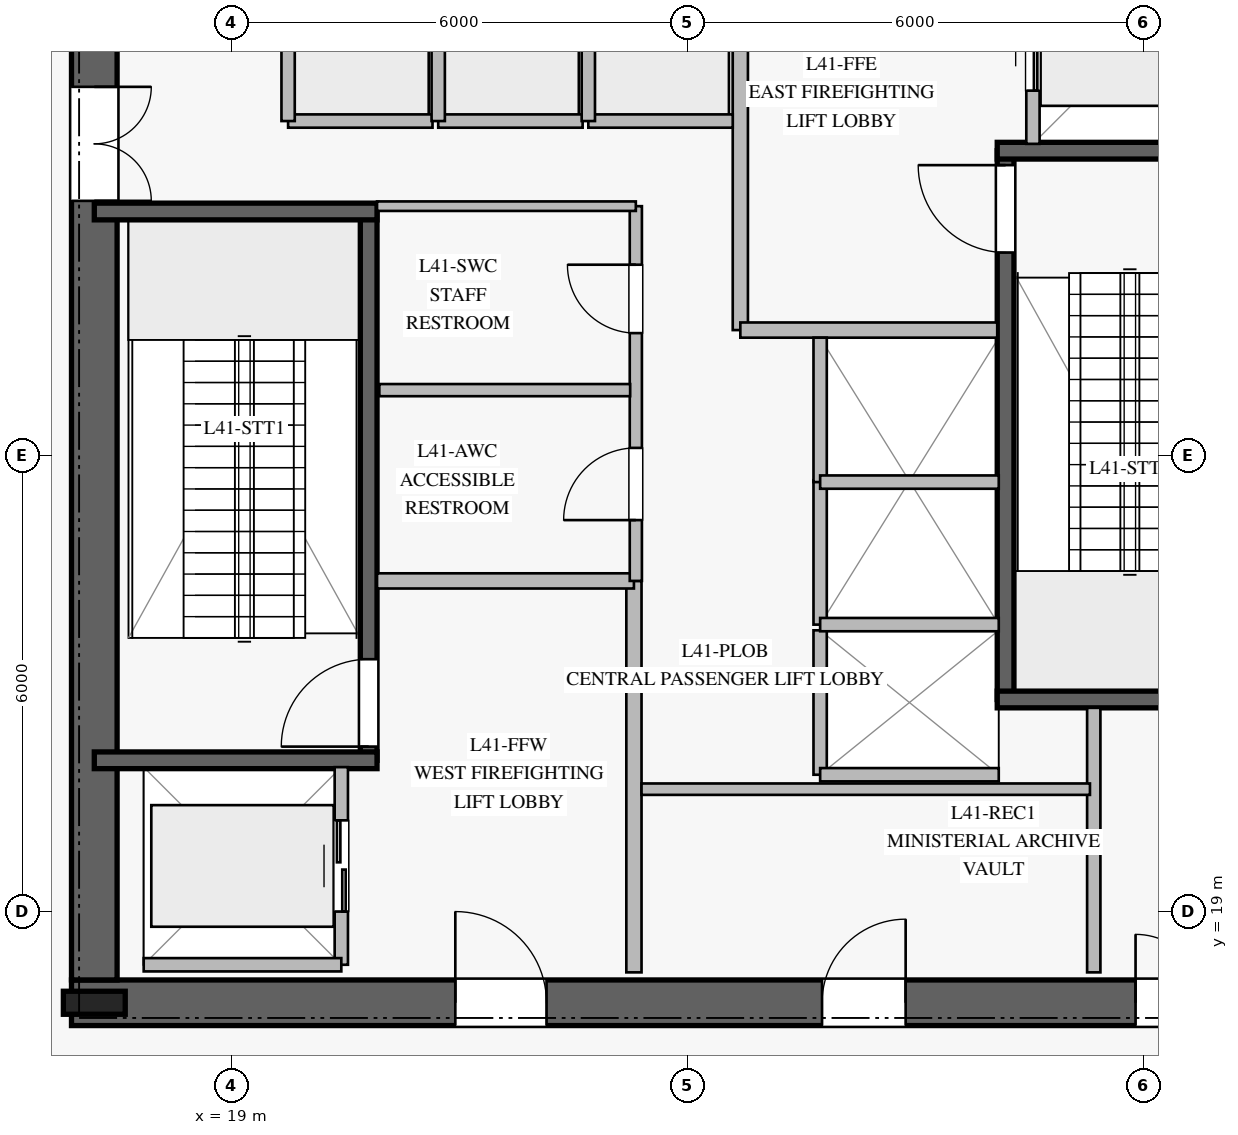
"""IFC4 building model, lengths in metres.
Left out: names, types, materials, properties, quantities, classifications, styles, units other than length and angle.
Written with IfcOpenShell. Run it as: python <this file> out.ifc"""

import sys

from ifc_helpers import new_model, si_unit, direction, frame, frame_2d, origin, origin_2d, place, context, subcontext, project, spatial, rectangle, i_section, extrude, element, fill, save


model = new_model("IFC4")
c1 = context("Model", 3, precision=1e-05, world=origin(), true_north=direction((0.0, 1.0)))
c2 = subcontext(c1, "Body", "Model", "MODEL_VIEW")
j1 = project(units=[si_unit("LENGTHUNIT", "METRE"), si_unit("PLANEANGLEUNIT", "RADIAN")], contexts=[c1])
p1 = place(None, origin())
s1 = spatial("IfcSite", under=j1, at=p1, CompositionType="ELEMENT")
p2 = place(p1, origin())
s2 = spatial("IfcBuilding", under=s1, at=p2, CompositionType="ELEMENT")
p3 = place(p2, frame((0.0, 0.0, 170.4)))
s3 = spatial("IfcBuildingStorey", under=s2, at=p3, CompositionType="ELEMENT", Elevation=170.4)
p4 = place(p3, frame((16.9, 17.8, 0.0), z_axis=(0.0, 0.0, 1.0), x_axis=(1.0, 0.0, 0.0)))
e1 = element("IfcWall", 1, at=p4, inside=s3, PredefinedType="SHEAR", context=c2, shape_type="SweptSolid", body=[
    extrude(rectangle(XDim=16.2, YDim=0.6, at=frame_2d((8.1, 0.0))), origin(), (0.0, 0.0, 1.0), 5.14),
])
p5 = place(p4, frame((5.05, 0.0, 0.0)))
e2 = element("IfcOpeningElement", 2, at=p5, cuts=e1, PredefinedType="OPENING", context=c2, shape_type="SweptSolid", body=[
    extrude(rectangle(XDim=1.2, YDim=2.25, at=frame_2d((0.6, 1.125))), frame((0.0, 0.31, 0.0), z_axis=(0.0, -1.0, 0.0), x_axis=(1.0, 0.0, 0.0)), (0.0, 0.0, 1.0), 0.62),
])
p6 = place(p4, frame((14.0, 0.0, 0.0)))
e3 = element("IfcOpeningElement", 3, at=p6, cuts=e1, PredefinedType="OPENING", context=c2, shape_type="SweptSolid", body=[
    extrude(rectangle(XDim=0.9, YDim=2.1, at=frame_2d((0.45, 1.05))), frame((0.0, 0.31, 0.0), z_axis=(0.0, -1.0, 0.0), x_axis=(1.0, 0.0, 0.0)), (0.0, 0.0, 1.0), 0.62),
])
p7 = place(p4, frame((9.875, 0.0, 0.0)))
e4 = element("IfcOpeningElement", 4, at=p7, cuts=e1, PredefinedType="OPENING", context=c2, shape_type="SweptSolid", body=[
    extrude(rectangle(XDim=1.1, YDim=2.2, at=frame_2d((0.55, 1.1))), frame((0.0, 0.31, 0.0), z_axis=(0.0, -1.0, 0.0), x_axis=(1.0, 0.0, 0.0)), (0.0, 0.0, 1.0), 0.62),
])
p8 = place(p3, frame((17.2, 31.9, 0.0), z_axis=(0.0, 0.0, 1.0), x_axis=(0.0, -1.0, 0.0)))
e5 = element("IfcWall", 5, at=p8, inside=s3, PredefinedType="SHEAR", context=c2, shape_type="SweptSolid", body=[
    extrude(rectangle(XDim=13.8, YDim=0.6, at=frame_2d((6.9, 0.0))), origin(), (0.0, 0.0, 1.0), 5.14),
])
p9 = place(p8, frame((2.05, 0.0, 0.0)))
e6 = element("IfcOpeningElement", 6, at=p9, cuts=e5, PredefinedType="OPENING", context=c2, shape_type="SweptSolid", body=[
    extrude(rectangle(XDim=1.5, YDim=2.2, at=frame_2d((0.75, 1.1))), frame((0.0, 0.31, 0.0), z_axis=(0.0, -1.0, 0.0), x_axis=(1.0, 0.0, 0.0)), (0.0, 0.0, 1.0), 0.62),
])
p10 = place(p3, frame((17.2, 17.8, 0.0), z_axis=(0.0, 0.0, 1.0), x_axis=(1.0, 0.0, 0.0)))
e7 = element("IfcColumn", 7, at=p10, inside=s3, PredefinedType="COLUMN", context=c2, shape_type="SweptSolid", body=[
    extrude(i_section(OverallWidth=0.303, OverallDepth=0.814, WebThickness=0.021, FlangeThickness=0.04, at=origin_2d()), origin(), (0.0, 0.0, 1.0), 5.4),
])
p11 = place(p3, frame((20.81, 20.99, 0.0), z_axis=(0.0, 0.0, 1.0), x_axis=(0.0, 1.0, 0.0)))
e8 = element("IfcWall", 8, at=p11, inside=s3, PredefinedType="SOLIDWALL", context=c2, shape_type="SweptSolid", body=[
    extrude(rectangle(XDim=7.22, YDim=0.22, at=frame_2d((3.61, 0.0))), origin(), (0.0, 0.0, 1.0), 5.14),
])
p12 = place(p11, frame((0.18, 0.0, 0.0)))
e9 = element("IfcOpeningElement", 9, at=p12, cuts=e8, PredefinedType="OPENING", context=c2, shape_type="SweptSolid", body=[
    extrude(rectangle(XDim=1.15, YDim=2.2, at=frame_2d((0.575, 1.1))), frame((0.0, 0.12, 0.0), z_axis=(0.0, -1.0, 0.0), x_axis=(1.0, 0.0, 0.0)), (0.0, 0.0, 1.0), 0.24),
])
for number, where, z_axis, x_axis in (
    (10, (17.2, 20.99, 0.0), (0.0, 0.0, 1.0), (1.0, 0.0, 0.0)),
    (11, (17.2, 28.21, 0.0), (0.0, 0.0, 1.0), (1.0, 0.0, 0.0)),
):
    element("IfcWall", number, at=place(p3, frame(where, z_axis=z_axis, x_axis=x_axis)), inside=s3, PredefinedType="SOLIDWALL", context=c2, shape_type="SweptSolid", body=[
        extrude(rectangle(XDim=3.72, YDim=0.22, at=frame_2d((1.86, 0.0))), origin(), (0.0, 0.0, 1.0), 5.14),
    ])
p13 = place(p3, frame((29.19, 21.79, 0.0), z_axis=(0.0, 0.0, 1.0), x_axis=(0.0, 1.0, 0.0)))
e12 = element("IfcWall", 12, at=p13, inside=s3, PredefinedType="SOLIDWALL", context=c2, shape_type="SweptSolid", body=[
    extrude(rectangle(XDim=7.22, YDim=0.22, at=frame_2d((3.61, 0.0))), origin(), (0.0, 0.0, 1.0), 5.14),
])
p14 = place(p13, frame((5.88, 0.0, 0.0)))
e13 = element("IfcOpeningElement", 13, at=p14, cuts=e12, PredefinedType="OPENING", context=c2, shape_type="SweptSolid", body=[
    extrude(rectangle(XDim=1.15, YDim=2.2, at=frame_2d((0.575, 1.1))), frame((0.0, 0.12, 0.0), z_axis=(0.0, -1.0, 0.0), x_axis=(1.0, 0.0, 0.0)), (0.0, 0.0, 1.0), 0.24),
])
for number, where, z_axis, x_axis in (
    (14, (29.08, 21.79, 0.0), (0.0, 0.0, 1.0), (1.0, 0.0, 0.0)),
    (15, (29.08, 29.01, 0.0), (0.0, 0.0, 1.0), (1.0, 0.0, 0.0)),
):
    element("IfcWall", number, at=place(p3, frame(where, z_axis=z_axis, x_axis=x_axis)), inside=s3, PredefinedType="SOLIDWALL", context=c2, shape_type="SweptSolid", body=[
        extrude(rectangle(XDim=3.72, YDim=0.22, at=frame_2d((1.86, 0.0))), origin(), (0.0, 0.0, 1.0), 5.14),
    ])
p15 = place(p3, frame((24.3, 18.2, 0.0), z_axis=(0.0, 0.0, 1.0), x_axis=(0.0, 1.0, 0.0)))
e16 = element("IfcWall", 16, at=p15, inside=s3, PredefinedType="PARTITIONING", context=c2, shape_type="SweptSolid", body=[
    extrude(rectangle(XDim=5.15, YDim=0.2, at=frame_2d((2.575, 0.0))), origin(), (0.0, 0.0, 1.0), 5.14),
])
p16 = place(p3, frame((20.92, 23.35, 0.0), z_axis=(0.0, 0.0, 1.0), x_axis=(1.0, 0.0, 0.0)))
e17 = element("IfcWall", 17, at=p16, inside=s3, PredefinedType="PARTITIONING", context=c2, shape_type="SweptSolid", body=[
    extrude(rectangle(XDim=3.38, YDim=0.2, at=frame_2d((1.69, 0.0))), origin(), (0.0, 0.0, 1.0), 5.14),
])
p17 = place(p3, frame((25.7, 26.65, 0.0), z_axis=(0.0, 0.0, 1.0), x_axis=(0.0, 1.0, 0.0)))
e18 = element("IfcWall", 18, at=p17, inside=s3, PredefinedType="PARTITIONING", context=c2, shape_type="SweptSolid", body=[
    extrude(rectangle(XDim=5.15, YDim=0.2, at=frame_2d((2.575, 0.0))), origin(), (0.0, 0.0, 1.0), 5.14),
])
p18 = place(p3, frame((25.7, 26.65, 0.0), z_axis=(0.0, 0.0, 1.0), x_axis=(1.0, 0.0, 0.0)))
e19 = element("IfcWall", 19, at=p18, inside=s3, PredefinedType="PARTITIONING", context=c2, shape_type="SweptSolid", body=[
    extrude(rectangle(XDim=3.38, YDim=0.2, at=frame_2d((1.69, 0.0))), origin(), (0.0, 0.0, 1.0), 5.14),
])
p19 = place(p3, frame((24.325, 23.35, 0.0), z_axis=(0.0, 0.0, 1.0), x_axis=(0.0, 1.0, 0.0)))
e20 = element("IfcWall", 20, at=p19, inside=s3, PredefinedType="PLUMBINGWALL", context=c2, shape_type="SweptSolid", body=[
    extrude(rectangle(XDim=4.93, YDim=0.16, at=frame_2d((2.465, 0.0))), origin(), (0.0, 0.0, 1.0), 5.14),
])
p20 = place(p19, frame((0.8, 0.0, 0.0)))
e21 = element("IfcOpeningElement", 21, at=p20, cuts=e20, PredefinedType="OPENING", context=c2, shape_type="SweptSolid", body=[
    extrude(rectangle(XDim=0.95, YDim=2.1, at=frame_2d((0.475, 1.05))), frame((0.0, 0.09, 0.0), z_axis=(0.0, -1.0, 0.0), x_axis=(1.0, 0.0, 0.0)), (0.0, 0.0, 1.0), 0.18),
])
p21 = place(p19, frame((3.26, 0.0, 0.0)))
e22 = element("IfcOpeningElement", 22, at=p21, cuts=e20, PredefinedType="OPENING", context=c2, shape_type="SweptSolid", body=[
    extrude(rectangle(XDim=0.9, YDim=2.1, at=frame_2d((0.45, 1.05))), frame((0.0, 0.09, 0.0), z_axis=(0.0, -1.0, 0.0), x_axis=(1.0, 0.0, 0.0)), (0.0, 0.0, 1.0), 0.18),
])
p22 = place(p3, frame((20.92, 28.28, 0.0), z_axis=(0.0, 0.0, 1.0), x_axis=(1.0, 0.0, 0.0)))
e23 = element("IfcWall", 23, at=p22, inside=s3, PredefinedType="PARTITIONING", context=c2, shape_type="SweptSolid", body=[
    extrude(rectangle(XDim=3.405, YDim=0.125, at=frame_2d((1.703, 0.0))), origin(), (0.0, 0.0, 1.0), 5.14),
])
p23 = place(p3, frame((20.95, 25.86, 0.0), z_axis=(0.0, 0.0, 1.0), x_axis=(1.0, 0.0, 0.0)))
e24 = element("IfcWall", 24, at=p23, inside=s3, PredefinedType="PLUMBINGWALL", context=c2, shape_type="SweptSolid", body=[
    extrude(rectangle(XDim=3.3, YDim=0.16, at=frame_2d((1.65, 0.0))), origin(), (0.0, 0.0, 1.0), 5.14),
])
p24 = place(p3, frame((30.35, 18.2, 0.0), z_axis=(0.0, 0.0, 1.0), x_axis=(0.0, 1.0, 0.0)))
e25 = element("IfcWall", 25, at=p24, inside=s3, PredefinedType="PARTITIONING", context=c2, shape_type="SweptSolid", body=[
    extrude(rectangle(XDim=3.48, YDim=0.175, at=frame_2d((1.74, 0.0))), origin(), (0.0, 0.0, 1.0), 5.14),
])
p25 = place(p3, frame((24.4, 20.61, 0.0), z_axis=(0.0, 0.0, 1.0), x_axis=(1.0, 0.0, 0.0)))
e26 = element("IfcWall", 26, at=p25, inside=s3, PredefinedType="PARTITIONING", context=c2, shape_type="SweptSolid", body=[
    extrude(rectangle(XDim=5.9, YDim=0.15, at=frame_2d((2.95, 0.0))), origin(), (0.0, 0.0, 1.0), 5.14),
])
p26 = place(p3, frame((19.75, 29.4, 0.0), z_axis=(0.0, 0.0, 1.0), x_axis=(1.0, 0.0, 0.0)))
e27 = element("IfcWall", 27, at=p26, inside=s3, PredefinedType="PARTITIONING", context=c2, shape_type="SweptSolid", body=[
    extrude(rectangle(XDim=1.9, YDim=0.175, at=frame_2d((0.95, 0.0))), origin(), (0.0, 0.0, 1.0), 5.14),
])
p27 = place(p3, frame((19.75, 29.4, 0.0), z_axis=(0.0, 0.0, 1.0), x_axis=(0.0, 1.0, 0.0)))
e28 = element("IfcWall", 28, at=p27, inside=s3, PredefinedType="PARTITIONING", context=c2, shape_type="SweptSolid", body=[
    extrude(rectangle(XDim=2.35, YDim=0.175, at=frame_2d((1.175, 0.0))), origin(), (0.0, 0.0, 1.0), 5.14),
])
p28 = place(p3, frame((21.725, 29.4, 0.0), z_axis=(0.0, 0.0, 1.0), x_axis=(1.0, 0.0, 0.0)))
e29 = element("IfcWall", 29, at=p28, inside=s3, PredefinedType="PARTITIONING", context=c2, shape_type="SweptSolid", body=[
    extrude(rectangle(XDim=1.9, YDim=0.175, at=frame_2d((0.95, 0.0))), origin(), (0.0, 0.0, 1.0), 5.14),
])
p29 = place(p3, frame((21.725, 29.4, 0.0), z_axis=(0.0, 0.0, 1.0), x_axis=(0.0, 1.0, 0.0)))
e30 = element("IfcWall", 30, at=p29, inside=s3, PredefinedType="PARTITIONING", context=c2, shape_type="SweptSolid", body=[
    extrude(rectangle(XDim=2.35, YDim=0.175, at=frame_2d((1.175, 0.0))), origin(), (0.0, 0.0, 1.0), 5.14),
])
p30 = place(p3, frame((23.7, 29.4, 0.0), z_axis=(0.0, 0.0, 1.0), x_axis=(1.0, 0.0, 0.0)))
e31 = element("IfcWall", 31, at=p30, inside=s3, PredefinedType="PARTITIONING", context=c2, shape_type="SweptSolid", body=[
    extrude(rectangle(XDim=1.9, YDim=0.175, at=frame_2d((0.95, 0.0))), origin(), (0.0, 0.0, 1.0), 5.14),
])
p31 = place(p3, frame((23.7, 29.4, 0.0), z_axis=(0.0, 0.0, 1.0), x_axis=(0.0, 1.0, 0.0)))
e32 = element("IfcWall", 32, at=p31, inside=s3, PredefinedType="PARTITIONING", context=c2, shape_type="SweptSolid", body=[
    extrude(rectangle(XDim=2.35, YDim=0.175, at=frame_2d((1.175, 0.0))), origin(), (0.0, 0.0, 1.0), 5.14),
])
p32 = place(p3, frame((26.75, 20.8, 0.0), z_axis=(0.0, 0.0, 1.0), x_axis=(0.0, 1.0, 0.0)))
e33 = element("IfcWall", 33, at=p32, inside=s3, PredefinedType="PARTITIONING", context=c2, shape_type="SweptSolid", body=[
    extrude(rectangle(XDim=1.9, YDim=0.175, at=frame_2d((0.95, 0.0))), origin(), (0.0, 0.0, 1.0), 5.14),
])
p33 = place(p3, frame((26.75, 20.8, 0.0), z_axis=(0.0, 0.0, 1.0), x_axis=(1.0, 0.0, 0.0)))
e34 = element("IfcWall", 34, at=p33, inside=s3, PredefinedType="PARTITIONING", context=c2, shape_type="SweptSolid", body=[
    extrude(rectangle(XDim=2.35, YDim=0.175, at=frame_2d((1.175, 0.0))), origin(), (0.0, 0.0, 1.0), 5.14),
])
p34 = place(p3, frame((26.75, 22.775, 0.0), z_axis=(0.0, 0.0, 1.0), x_axis=(0.0, 1.0, 0.0)))
e35 = element("IfcWall", 35, at=p34, inside=s3, PredefinedType="PARTITIONING", context=c2, shape_type="SweptSolid", body=[
    extrude(rectangle(XDim=1.9, YDim=0.175, at=frame_2d((0.95, 0.0))), origin(), (0.0, 0.0, 1.0), 5.14),
])
p35 = place(p3, frame((26.75, 22.775, 0.0), z_axis=(0.0, 0.0, 1.0), x_axis=(1.0, 0.0, 0.0)))
e36 = element("IfcWall", 36, at=p35, inside=s3, PredefinedType="PARTITIONING", context=c2, shape_type="SweptSolid", body=[
    extrude(rectangle(XDim=2.35, YDim=0.175, at=frame_2d((1.175, 0.0))), origin(), (0.0, 0.0, 1.0), 5.14),
])
p36 = place(p3, frame((26.75, 24.65, 0.0), z_axis=(0.0, 0.0, 1.0), x_axis=(0.0, 1.0, 0.0)))
e37 = element("IfcWall", 37, at=p36, inside=s3, PredefinedType="PARTITIONING", context=c2, shape_type="SweptSolid", body=[
    extrude(rectangle(XDim=1.9, YDim=0.175, at=frame_2d((0.95, 0.0))), origin(), (0.0, 0.0, 1.0), 5.14),
])
p37 = place(p3, frame((26.75, 24.65, 0.0), z_axis=(0.0, 0.0, 1.0), x_axis=(1.0, 0.0, 0.0)))
e38 = element("IfcWall", 38, at=p37, inside=s3, PredefinedType="PARTITIONING", context=c2, shape_type="SweptSolid", body=[
    extrude(rectangle(XDim=2.35, YDim=0.175, at=frame_2d((1.175, 0.0))), origin(), (0.0, 0.0, 1.0), 5.14),
])
p38 = place(p3, frame((20.45, 18.3, 0.0), z_axis=(0.0, 0.0, 1.0), x_axis=(0.0, 1.0, 0.0)))
e39 = element("IfcWall", 39, at=p38, inside=s3, PredefinedType="PARTITIONING", context=c2, shape_type="SweptSolid", body=[
    extrude(rectangle(XDim=2.6, YDim=0.175, at=frame_2d((1.3, 0.0))), origin(), (0.0, 0.0, 1.0), 5.14),
])
p39 = place(p38, frame((0.7, 0.0, 0.0)))
e40 = element("IfcOpeningElement", 40, at=p39, cuts=e39, PredefinedType="OPENING", context=c2, shape_type="SweptSolid", body=[
    extrude(rectangle(XDim=1.2, YDim=2.2, at=frame_2d((0.6, 1.1))), frame((0.0, 0.098, 0.0), z_axis=(0.0, -1.0, 0.0), x_axis=(1.0, 0.0, 0.0)), (0.0, 0.0, 1.0), 0.195),
])
p40 = place(p3, frame((17.85, 18.3, 0.0), z_axis=(0.0, 0.0, 1.0), x_axis=(1.0, 0.0, 0.0)))
e41 = element("IfcWall", 41, at=p40, inside=s3, PredefinedType="PARTITIONING", context=c2, shape_type="SweptSolid", body=[
    extrude(rectangle(XDim=2.6, YDim=0.175, at=frame_2d((1.3, 0.0))), origin(), (0.0, 0.0, 1.0), 5.14),
])
p41 = place(p3, frame((29.55, 29.1, 0.0), z_axis=(0.0, 0.0, 1.0), x_axis=(0.0, 1.0, 0.0)))
e42 = element("IfcWall", 42, at=p41, inside=s3, PredefinedType="PARTITIONING", context=c2, shape_type="SweptSolid", body=[
    extrude(rectangle(XDim=2.6, YDim=0.175, at=frame_2d((1.3, 0.0))), origin(), (0.0, 0.0, 1.0), 5.14),
])
p42 = place(p41, frame((0.7, 0.0, 0.0)))
e43 = element("IfcOpeningElement", 43, at=p42, cuts=e42, PredefinedType="OPENING", context=c2, shape_type="SweptSolid", body=[
    extrude(rectangle(XDim=1.2, YDim=2.2, at=frame_2d((0.6, 1.1))), frame((0.0, 0.098, 0.0), z_axis=(0.0, -1.0, 0.0), x_axis=(1.0, 0.0, 0.0)), (0.0, 0.0, 1.0), 0.195),
])
p43 = place(p12, origin())
e44 = element("IfcDoor", 44, at=p43, inside=s3, OperationType="SINGLE_SWING_LEFT", PredefinedType="DOOR", context=c2, shape_type="SweptSolid", body=[
    extrude(rectangle(XDim=1.15, YDim=2.2, at=frame_2d((0.575, 1.1))), frame((0.0, 0.025, 0.0), z_axis=(0.0, -1.0, 0.0), x_axis=(1.0, 0.0, 0.0)), (0.0, 0.0, 1.0), 0.05),
])
fill(e9, e44)
p44 = place(p14, origin())
e45 = element("IfcDoor", 45, at=p44, inside=s3, OperationType="SINGLE_SWING_RIGHT", PredefinedType="DOOR", context=c2, shape_type="SweptSolid", body=[
    extrude(rectangle(XDim=1.15, YDim=2.2, at=frame_2d((0.575, 1.1))), frame((0.0, 0.025, 0.0), z_axis=(0.0, -1.0, 0.0), x_axis=(1.0, 0.0, 0.0)), (0.0, 0.0, 1.0), 0.05),
])
fill(e13, e45)
p45 = place(p5, origin())
e46 = element("IfcDoor", 46, at=p45, inside=s3, OperationType="SINGLE_SWING_LEFT", PredefinedType="DOOR", context=c2, shape_type="SweptSolid", body=[
    extrude(rectangle(XDim=1.2, YDim=2.25, at=frame_2d((0.6, 1.125))), frame((0.0, 0.025, 0.0), z_axis=(0.0, -1.0, 0.0), x_axis=(1.0, 0.0, 0.0)), (0.0, 0.0, 1.0), 0.05),
])
fill(e2, e46)
p46 = place(p9, origin())
e47 = element("IfcDoor", 47, at=p46, inside=s3, OperationType="DOUBLE_DOOR_SINGLE_SWING", PredefinedType="DOOR", context=c2, shape_type="SweptSolid", body=[
    extrude(rectangle(XDim=1.5, YDim=2.2, at=frame_2d((0.75, 1.1))), frame((0.0, 0.025, 0.0), z_axis=(0.0, -1.0, 0.0), x_axis=(1.0, 0.0, 0.0)), (0.0, 0.0, 1.0), 0.05),
])
fill(e6, e47)
p47 = place(p20, origin())
e48 = element("IfcDoor", 48, at=p47, inside=s3, OperationType="SINGLE_SWING_LEFT", PredefinedType="DOOR", context=c2, shape_type="SweptSolid", body=[
    extrude(rectangle(XDim=0.95, YDim=2.1, at=frame_2d((0.475, 1.05))), frame((0.0, 0.025, 0.0), z_axis=(0.0, -1.0, 0.0), x_axis=(1.0, 0.0, 0.0)), (0.0, 0.0, 1.0), 0.05),
])
fill(e21, e48)
p48 = place(p21, origin())
e49 = element("IfcDoor", 49, at=p48, inside=s3, OperationType="SINGLE_SWING_RIGHT", PredefinedType="DOOR", context=c2, shape_type="SweptSolid", body=[
    extrude(rectangle(XDim=0.9, YDim=2.1, at=frame_2d((0.45, 1.05))), frame((0.0, 0.025, 0.0), z_axis=(0.0, -1.0, 0.0), x_axis=(1.0, 0.0, 0.0)), (0.0, 0.0, 1.0), 0.05),
])
fill(e22, e49)
p49 = place(p6, origin())
e50 = element("IfcDoor", 50, at=p49, inside=s3, OperationType="SINGLE_SWING_LEFT", PredefinedType="DOOR", context=c2, shape_type="SweptSolid", body=[
    extrude(rectangle(XDim=0.9, YDim=2.1, at=frame_2d((0.45, 1.05))), frame((0.0, 0.025, 0.0), z_axis=(0.0, -1.0, 0.0), x_axis=(1.0, 0.0, 0.0)), (0.0, 0.0, 1.0), 0.05),
])
fill(e3, e50)
p50 = place(p7, origin())
e51 = element("IfcDoor", 51, at=p50, inside=s3, OperationType="SINGLE_SWING_RIGHT", PredefinedType="DOOR", context=c2, shape_type="SweptSolid", body=[
    extrude(rectangle(XDim=1.1, YDim=2.2, at=frame_2d((0.55, 1.1))), frame((0.0, 0.025, 0.0), z_axis=(0.0, -1.0, 0.0), x_axis=(1.0, 0.0, 0.0)), (0.0, 0.0, 1.0), 0.05),
])
fill(e4, e51)
p51 = place(p39, origin())
e52 = element("IfcDoor", 52, at=p51, inside=s3, OperationType="DOUBLE_DOOR_SLIDING", PredefinedType="DOOR", context=c2, shape_type="SweptSolid", body=[
    extrude(rectangle(XDim=1.2, YDim=2.2, at=frame_2d((0.6, 1.1))), frame((0.0, 0.025, 0.0), z_axis=(0.0, -1.0, 0.0), x_axis=(1.0, 0.0, 0.0)), (0.0, 0.0, 1.0), 0.05),
])
fill(e40, e52)
p52 = place(p42, origin())
e53 = element("IfcDoor", 53, at=p52, inside=s3, OperationType="DOUBLE_DOOR_SLIDING", PredefinedType="DOOR", context=c2, shape_type="SweptSolid", body=[
    extrude(rectangle(XDim=1.2, YDim=2.2, at=frame_2d((0.6, 1.1))), frame((0.0, 0.025, 0.0), z_axis=(0.0, -1.0, 0.0), x_axis=(1.0, 0.0, 0.0)), (0.0, 0.0, 1.0), 0.05),
])
fill(e43, e53)
save(model, sys.argv[1])
